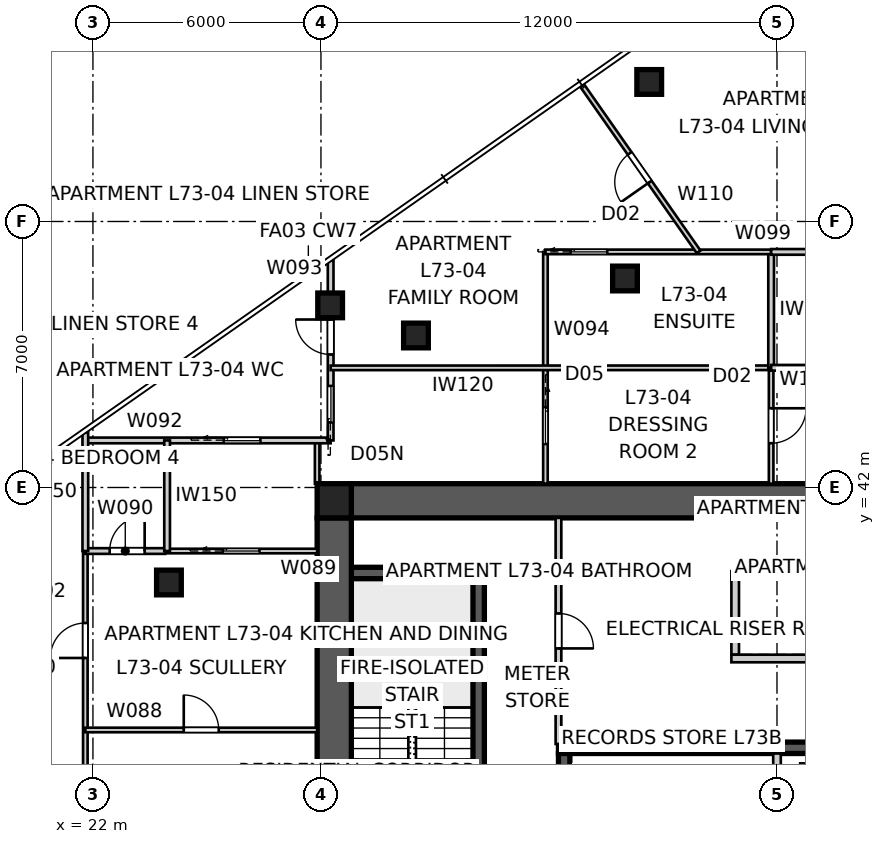
"""IFC4 building model, lengths in metres.
Left out: names, types, materials, properties, quantities, classifications, styles, units other than length and angle.
Written with IfcOpenShell. Run it as: python <this file> out.ifc"""

import sys

from ifc_helpers import new_model, si_unit, direction, frame, frame_2d, origin, origin_2d, place, context, subcontext, project, spatial, polyline, rectangle, outline, extrude, element, fill, save


model = new_model("IFC4")
c1 = context("Model", 3, precision=1e-05, world=origin(), true_north=direction((0.0, 1.0)))
c2 = subcontext(c1, "Body", "Model", "MODEL_VIEW")
j1 = project(units=[si_unit("LENGTHUNIT", "METRE"), si_unit("PLANEANGLEUNIT", "RADIAN")], contexts=[c1])
p1 = place(None, origin())
s1 = spatial("IfcSite", under=j1, at=p1, CompositionType="ELEMENT")
p2 = place(p1, origin())
s2 = spatial("IfcBuilding", under=s1, at=p2, CompositionType="ELEMENT")
p3 = place(p2, frame((0.0, 0.0, 264.2)))
s3 = spatial("IfcBuildingStorey", under=s2, at=p3, CompositionType="ELEMENT", Elevation=264.2)
p4 = place(p3, frame((28.8, 41.65, 0.0), z_axis=(0.0, 0.0, 1.0), x_axis=(1.0, 0.0, 0.0)))
e1 = element("IfcWall", 1, at=p4, inside=s3, PredefinedType="SHEAR", context=c2, shape_type="SweptSolid", body=[
    extrude(outline(polyline([(0.0, -0.45), (22.4, -0.45), (22.4, -0.025), (22.85, -0.025), (22.85, 0.025), (22.4, 0.025), (22.4, 0.45), (0.0, 0.45), (0.0, 0.025), (-0.45, 0.025), (-0.45, -0.025), (0.0, -0.025), (0.0, -0.45)])), origin(), (0.0, 0.0, 1.0), 3.4),
])
p5 = place(p3, frame((28.35, 41.2, 0.0), z_axis=(0.0, 0.0, 1.0), x_axis=(0.0, -1.0, 0.0)))
e2 = element("IfcWall", 2, at=p5, inside=s3, PredefinedType="SHEAR", context=c2, shape_type="SweptSolid", body=[
    extrude(outline(polyline([(0.0, -0.45), (22.4, -0.45), (22.4, -0.025), (22.85, -0.025), (22.85, 0.025), (22.4, 0.025), (22.4, 0.45), (0.0, 0.45), (0.0, 0.025), (-0.45, 0.025), (-0.45, -0.025), (0.0, -0.025), (0.0, -0.45)])), origin(), (0.0, 0.0, 1.0), 3.4),
])
p6 = place(p5, frame((11.14, 0.0, 0.0)))
e3 = element("IfcOpeningElement", 3, at=p6, cuts=e2, PredefinedType="OPENING", context=c2, shape_type="SweptSolid", body=[
    extrude(rectangle(XDim=1.02, YDim=2.4, at=frame_2d((0.51, 1.2))), frame((0.0, 0.46, 0.0), z_axis=(0.0, -1.0, 0.0), x_axis=(1.0, 0.0, 0.0)), (0.0, 0.0, 1.0), 0.92),
])
p7 = place(p3, frame((34.25, 35.15, 0.0), z_axis=(0.0, 0.0, 1.0), x_axis=(1.0, 0.0, 0.0)))
e4 = element("IfcWall", 4, at=p7, inside=s3, PredefinedType="SHEAR", context=c2, shape_type="SweptSolid", body=[
    extrude(rectangle(XDim=11.5, YDim=0.3, at=frame_2d((5.75, 0.0))), origin(), (0.0, 0.0, 1.0), 3.4),
])
p8 = place(p3, frame((34.4, 32.2, 0.0), z_axis=(0.0, 0.0, 1.0), x_axis=(0.0, 1.0, 0.0)))
e5 = element("IfcWall", 5, at=p8, inside=s3, PredefinedType="SHEAR", context=c2, shape_type="SweptSolid", body=[
    extrude(rectangle(XDim=2.8, YDim=0.3, at=frame_2d((1.4, 0.0))), origin(), (0.0, 0.0, 1.0), 3.4),
])
p9 = place(p3, frame((40.0, 32.2, 0.0), z_axis=(0.0, 0.0, 1.0), x_axis=(0.0, 1.0, 0.0)))
e6 = element("IfcWall", 6, at=p9, inside=s3, PredefinedType="SOLIDWALL", context=c2, shape_type="SweptSolid", body=[
    extrude(rectangle(XDim=2.8, YDim=0.2, at=frame_2d((1.4, 0.0))), origin(), (0.0, 0.0, 1.0), 3.4),
])
p10 = place(p3, frame((32.15, 32.2, 0.0), z_axis=(0.0, 0.0, 1.0), x_axis=(0.0, 1.0, 0.0)))
e7 = element("IfcWall", 7, at=p10, inside=s3, PredefinedType="SHEAR", context=c2, shape_type="SweptSolid", body=[
    extrude(rectangle(XDim=7.7, YDim=0.3, at=frame_2d((3.85, 0.0))), origin(), (0.0, 0.0, 1.0), 3.4),
])
p11 = place(p3, frame((28.8, 39.75, 0.0), z_axis=(0.0, 0.0, 1.0), x_axis=(1.0, 0.0, 0.0)))
e8 = element("IfcWall", 8, at=p11, inside=s3, PredefinedType="SHEAR", context=c2, shape_type="SweptSolid", body=[
    extrude(rectangle(XDim=3.5, YDim=0.3, at=frame_2d((1.75, 0.0))), origin(), (0.0, 0.0, 1.0), 3.4),
])
p12 = place(p3, frame((38.9, 37.6, 0.0), z_axis=(0.0, 0.0, 1.0), x_axis=(0.0, 1.0, 0.0)))
e9 = element("IfcWall", 9, at=p12, inside=s3, PredefinedType="SOLIDWALL", context=c2, shape_type="SweptSolid", body=[
    extrude(rectangle(XDim=2.0, YDim=0.2, at=frame_2d((1.0, 0.0))), origin(), (0.0, 0.0, 1.0), 3.4),
])
for number, where, z_axis, x_axis in (
    (10, (38.8, 37.5, 0.0), (0.0, 0.0, 1.0), (1.0, 0.0, 0.0)),
    (11, (38.8, 39.7, 0.0), (0.0, 0.0, 1.0), (1.0, 0.0, 0.0)),
):
    element("IfcWall", number, at=place(p3, frame(where, z_axis=z_axis, x_axis=x_axis)), inside=s3, PredefinedType="SOLIDWALL", context=c2, shape_type="SweptSolid", body=[
        extrude(rectangle(XDim=2.4, YDim=0.2, at=frame_2d((1.2, 0.0))), origin(), (0.0, 0.0, 1.0), 3.4),
    ])
p13 = place(p3, frame((28.35, 41.65, 0.0), z_axis=(0.0, 0.0, 1.0), x_axis=(1.0, 0.0, 0.0)))
e12 = element("IfcColumn", 12, at=p13, inside=s3, PredefinedType="COLUMN", context=c2, shape_type="SweptSolid", body=[
    extrude(rectangle(XDim=0.9, YDim=0.9, at=origin_2d()), origin(), (0.0, 0.0, 1.0), 3.4),
])
for number, where, z_axis, x_axis in (
    (13, (36.638, 52.672, 0.0), (0.0, 0.0, 1.0), (1.0, 0.0, 0.0)),
    (14, (28.242, 46.793, 0.0), (0.0, 0.0, 1.0), (1.0, 0.0, 0.0)),
):
    element("IfcColumn", number, at=place(p3, frame(where, z_axis=z_axis, x_axis=x_axis)), inside=s3, PredefinedType="COLUMN", context=c2, shape_type="SweptSolid", body=[
        extrude(rectangle(XDim=0.65, YDim=0.65, at=origin_2d()), origin(), (0.0, 0.0, 1.0), 3.2),
    ])
for number, where, z_axis, x_axis in (
    (15, (36.0, 47.5, 0.0), (0.0, 0.0, 1.0), (1.0, 0.0, 0.0)),
    (16, (30.5, 46.0, 0.0), (0.0, 0.0, 1.0), (1.0, 0.0, 0.0)),
    (17, (24.0, 39.5, 0.0), (0.0, 0.0, 1.0), (1.0, 0.0, 0.0)),
):
    element("IfcColumn", number, at=place(p3, frame(where, z_axis=z_axis, x_axis=x_axis)), inside=s3, PredefinedType="COLUMN", context=c2, shape_type="SweptSolid", body=[
        extrude(rectangle(XDim=0.65, YDim=0.65, at=origin_2d()), origin(), (0.0, 0.0, 1.0), 3.4),
    ])
p14 = place(p3, frame((34.25, 41.2, 0.0), z_axis=(0.0, 0.0, 1.0), x_axis=(0.0, -1.0, 0.0)))
e18 = element("IfcWall", 18, at=p14, inside=s3, PredefinedType="SOLIDWALL", context=c2, shape_type="SweptSolid", body=[
    extrude(rectangle(XDim=5.95, YDim=0.15, at=frame_2d((2.975, 0.0))), origin(), (0.0, 0.0, 1.0), 3.2),
])
p15 = place(p14, frame((2.515, 0.0, 0.0)))
e19 = element("IfcOpeningElement", 19, at=p15, cuts=e18, PredefinedType="OPENING", context=c2, shape_type="SweptSolid", body=[
    extrude(rectangle(XDim=0.92, YDim=2.1, at=frame_2d((0.46, 1.05))), frame((0.0, 0.085, 0.0), z_axis=(0.0, -1.0, 0.0), x_axis=(1.0, 0.0, 0.0)), (0.0, 0.0, 1.0), 0.17),
])
p16 = place(p3, frame((21.8, 18.578, 0.0), z_axis=(0.0, 0.0, 1.0), x_axis=(0.0, 1.0, 0.0)))
e20 = element("IfcWall", 20, at=p16, inside=s3, PredefinedType="PARTITIONING", context=c2, shape_type="SweptSolid", body=[
    extrude(rectangle(XDim=21.75, YDim=0.12, at=frame_2d((10.875, 0.0))), origin(), (0.0, 0.0, 1.0), 3.2),
])
p17 = place(p16, frame((11.53, 0.0, 0.0)))
e21 = element("IfcOpeningElement", 21, at=p17, cuts=e20, PredefinedType="OPENING", context=c2, shape_type="SweptSolid", body=[
    extrude(rectangle(XDim=0.92, YDim=2.34, at=frame_2d((0.46, 1.17))), frame((0.0, 0.07, 0.0), z_axis=(0.0, -1.0, 0.0), x_axis=(1.0, 0.0, 0.0)), (0.0, 0.0, 1.0), 0.14),
])
p18 = place(p16, frame((5.585, 0.0, 0.0)))
e22 = element("IfcOpeningElement", 22, at=p18, cuts=e20, PredefinedType="OPENING", context=c2, shape_type="SweptSolid", body=[
    extrude(rectangle(XDim=0.96, YDim=2.1, at=frame_2d((0.48, 1.05))), frame((0.0, 0.07, 0.0), z_axis=(0.0, -1.0, 0.0), x_axis=(1.0, 0.0, 0.0)), (0.0, 0.0, 1.0), 0.14),
])
p19 = place(p16, frame((18.936, 0.0, 0.0)))
e23 = element("IfcOpeningElement", 23, at=p19, cuts=e20, PredefinedType="OPENING", context=c2, shape_type="SweptSolid", body=[
    extrude(rectangle(XDim=0.92, YDim=2.34, at=frame_2d((0.46, 1.17))), frame((0.0, 0.07, 0.0), z_axis=(0.0, -1.0, 0.0), x_axis=(1.0, 0.0, 0.0)), (0.0, 0.0, 1.0), 0.14),
])
p20 = place(p3, frame((21.8, 35.619, 0.0), z_axis=(0.0, 0.0, 1.0), x_axis=(1.0, 0.0, 0.0)))
e24 = element("IfcWall", 24, at=p20, inside=s3, PredefinedType="PARTITIONING", context=c2, shape_type="SweptSolid", body=[
    extrude(rectangle(XDim=6.1, YDim=0.12, at=frame_2d((3.05, 0.0))), origin(), (0.0, 0.0, 1.0), 3.2),
])
p21 = place(p20, frame((2.59, 0.0, 0.0)))
e25 = element("IfcOpeningElement", 25, at=p21, cuts=e24, PredefinedType="OPENING", context=c2, shape_type="SweptSolid", body=[
    extrude(rectangle(XDim=0.92, YDim=2.34, at=frame_2d((0.46, 1.17))), frame((0.0, 0.07, 0.0), z_axis=(0.0, -1.0, 0.0), x_axis=(1.0, 0.0, 0.0)), (0.0, 0.0, 1.0), 0.14),
])
p22 = place(p3, frame((23.902, 40.328, 0.0), z_axis=(0.0, 0.0, 1.0), x_axis=(1.0, 0.0, 0.0)))
e26 = element("IfcWall", 26, at=p22, inside=s3, PredefinedType="PARTITIONING", context=c2, shape_type="SweptSolid", body=[
    extrude(rectangle(XDim=3.998, YDim=0.12, at=frame_2d((1.999, 0.0))), origin(), (0.0, 0.0, 1.0), 3.2),
])
p23 = place(p22, frame((1.519, 0.0, 0.0)))
e27 = element("IfcOpeningElement", 27, at=p23, cuts=e26, PredefinedType="OPENING", context=c2, shape_type="SweptSolid", body=[
    extrude(rectangle(XDim=0.96, YDim=2.1, at=frame_2d((0.48, 1.05))), frame((0.0, 0.07, 0.0), z_axis=(0.0, -1.0, 0.0), x_axis=(1.0, 0.0, 0.0)), (0.0, 0.0, 1.0), 0.14),
])
p24 = place(p3, frame((21.8, 40.328, 0.0), z_axis=(0.0, 0.0, 1.0), x_axis=(1.0, 0.0, 0.0)))
e28 = element("IfcWall", 28, at=p24, inside=s3, PredefinedType="SOLIDWALL", context=c2, shape_type="SweptSolid", body=[
    extrude(rectangle(XDim=2.102, YDim=0.15, at=frame_2d((1.051, 0.0))), origin(), (0.0, 0.0, 1.0), 3.2),
])
p25 = place(p24, frame((0.641, 0.0, 0.0)))
e29 = element("IfcOpeningElement", 29, at=p25, cuts=e28, PredefinedType="OPENING", context=c2, shape_type="SweptSolid", body=[
    extrude(rectangle(XDim=0.92, YDim=2.34, at=frame_2d((0.46, 1.17))), frame((0.0, 0.085, 0.0), z_axis=(0.0, -1.0, 0.0), x_axis=(1.0, 0.0, 0.0)), (0.0, 0.0, 1.0), 0.17),
])
p26 = place(p3, frame((27.9, 42.1, 0.0), z_axis=(0.0, 0.0, 1.0), x_axis=(0.0, 1.0, 0.0)))
e30 = element("IfcWall", 30, at=p26, inside=s3, PredefinedType="PARTITIONING", context=c2, shape_type="SweptSolid", body=[
    extrude(rectangle(XDim=1.138, YDim=0.12, at=frame_2d((0.569, 0.0))), origin(), (0.0, 0.0, 1.0), 3.2),
])
p27 = place(p3, frame((21.8, 43.238, 0.0), z_axis=(0.0, 0.0, 1.0), x_axis=(1.0, 0.0, 0.0)))
e31 = element("IfcWall", 31, at=p27, inside=s3, PredefinedType="SOLIDWALL", context=c2, shape_type="SweptSolid", body=[
    extrude(rectangle(XDim=6.455, YDim=0.15, at=frame_2d((3.228, 0.0))), origin(), (0.0, 0.0, 1.0), 3.2),
])
p28 = place(p27, frame((3.646, 0.0, 0.0)))
e32 = element("IfcOpeningElement", 32, at=p28, cuts=e31, PredefinedType="OPENING", context=c2, shape_type="SweptSolid", body=[
    extrude(rectangle(XDim=0.96, YDim=2.1, at=frame_2d((0.48, 1.05))), frame((0.0, 0.085, 0.0), z_axis=(0.0, -1.0, 0.0), x_axis=(1.0, 0.0, 0.0)), (0.0, 0.0, 1.0), 0.17),
])
p29 = place(p3, frame((28.255, 43.238, 0.0), z_axis=(0.0, 0.0, 1.0), x_axis=(0.0, 1.0, 0.0)))
e33 = element("IfcWall", 33, at=p29, inside=s3, PredefinedType="SOLIDWALL", context=c2, shape_type="SweptSolid", body=[
    extrude(rectangle(XDim=4.736, YDim=0.15, at=frame_2d((2.368, 0.0))), origin(), (0.0, 0.0, 1.0), 3.2),
])
p30 = place(p29, frame((2.262, 0.0, 0.0)))
e34 = element("IfcOpeningElement", 34, at=p30, cuts=e33, PredefinedType="OPENING", context=c2, shape_type="SweptSolid", body=[
    extrude(rectangle(XDim=0.92, YDim=2.34, at=frame_2d((0.46, 1.17))), frame((0.0, 0.085, 0.0), z_axis=(0.0, -1.0, 0.0), x_axis=(1.0, 0.0, 0.0)), (0.0, 0.0, 1.0), 0.17),
])
p31 = place(p29, frame((0.475, 0.0, 0.0)))
e35 = element("IfcOpeningElement", 35, at=p31, cuts=e33, PredefinedType="OPENING", context=c2, shape_type="SweptSolid", body=[
    extrude(rectangle(XDim=0.96, YDim=2.0, at=frame_2d((0.48, 1.0))), frame((0.0, 0.085, 0.0), z_axis=(0.0, -1.0, 0.0), x_axis=(1.0, 0.0, 0.0)), (0.0, 0.0, 1.0), 0.17),
])
p32 = place(p3, frame((33.907, 48.2, 0.0), z_axis=(0.0, 0.0, 1.0), x_axis=(0.0, -1.0, 0.0)))
e36 = element("IfcWall", 36, at=p32, inside=s3, PredefinedType="PARTITIONING", context=c2, shape_type="SweptSolid", body=[
    extrude(rectangle(XDim=6.1, YDim=0.12, at=frame_2d((3.05, 0.0))), origin(), (0.0, 0.0, 1.0), 3.2),
])
p33 = place(p32, frame((4.096, 0.0, 0.0)))
e37 = element("IfcOpeningElement", 37, at=p33, cuts=e36, PredefinedType="OPENING", context=c2, shape_type="SweptSolid", body=[
    extrude(rectangle(XDim=0.96, YDim=2.1, at=frame_2d((0.48, 1.05))), frame((0.0, 0.07, 0.0), z_axis=(0.0, -1.0, 0.0), x_axis=(1.0, 0.0, 0.0)), (0.0, 0.0, 1.0), 0.14),
])
p34 = place(p3, frame((28.255, 45.148, 0.0), z_axis=(0.0, 0.0, 1.0), x_axis=(0.99999998913, 0.000147442917, 0.0)))
e38 = element("IfcWall", 38, at=p34, inside=s3, PredefinedType="PARTITIONING", context=c2, shape_type="SweptSolid", body=[
    extrude(rectangle(XDim=11.591, YDim=0.12, at=frame_2d((5.795, 0.0))), origin(), (0.0, 0.0, 1.0), 3.2),
])
p35 = place(p3, frame((23.952, 40.328, 0.0), z_axis=(0.0, 0.0, 1.0), x_axis=(0.0, 1.0, 0.0)))
e39 = element("IfcWall", 39, at=p35, inside=s3, PredefinedType="SOLIDWALL", context=c2, shape_type="SweptSolid", body=[
    extrude(rectangle(XDim=2.91, YDim=0.15, at=frame_2d((1.455, 0.0))), origin(), (0.0, 0.0, 1.0), 3.2),
])
p36 = place(p3, frame((21.8, 40.328, 0.0), z_axis=(0.0, 0.0, 1.0), x_axis=(0.0, 1.0, 0.0)))
e40 = element("IfcWall", 40, at=p36, inside=s3, PredefinedType="SOLIDWALL", context=c2, shape_type="SweptSolid", body=[
    extrude(rectangle(XDim=3.126, YDim=0.15, at=frame_2d((1.563, 0.0))), origin(), (0.0, 0.0, 1.0), 3.2),
])
p37 = place(p3, frame((39.846, 48.2, 0.0), z_axis=(0.0, 0.0, 1.0), x_axis=(0.0, -1.0, 0.0)))
e41 = element("IfcWall", 41, at=p37, inside=s3, PredefinedType="SOLIDWALL", context=c2, shape_type="SweptSolid", body=[
    extrude(rectangle(XDim=3.05, YDim=0.15, at=frame_2d((1.525, 0.0))), origin(), (0.0, 0.0, 1.0), 3.2),
])
p38 = place(p3, frame((33.907, 48.2, 0.0), z_axis=(0.0, 0.0, 1.0), x_axis=(1.0, 0.0, 0.0)))
e42 = element("IfcWall", 42, at=p38, inside=s3, PredefinedType="PARTITIONING", context=c2, shape_type="SweptSolid", body=[
    extrude(rectangle(XDim=5.939, YDim=0.12, at=frame_2d((2.969, 0.0))), origin(), (0.0, 0.0, 1.0), 3.2),
])
p39 = place(p38, frame((0.666, 0.0, 0.0)))
e43 = element("IfcOpeningElement", 43, at=p39, cuts=e42, PredefinedType="OPENING", context=c2, shape_type="SweptSolid", body=[
    extrude(rectangle(XDim=0.96, YDim=2.1, at=frame_2d((0.48, 1.05))), frame((0.0, 0.07, 0.0), z_axis=(0.0, -1.0, 0.0), x_axis=(1.0, 0.0, 0.0)), (0.0, 0.0, 1.0), 0.14),
])
p40 = place(p3, frame((39.846, 45.15, 0.0), z_axis=(0.0, 0.0, 1.0), x_axis=(0.0, -1.0, 0.0)))
e44 = element("IfcWall", 44, at=p40, inside=s3, PredefinedType="PARTITIONING", context=c2, shape_type="SweptSolid", body=[
    extrude(rectangle(XDim=3.05, YDim=0.12, at=frame_2d((1.525, 0.0))), origin(), (0.0, 0.0, 1.0), 3.2),
])
p41 = place(p40, frame((1.065, 0.0, 0.0)))
e45 = element("IfcOpeningElement", 45, at=p41, cuts=e44, PredefinedType="OPENING", context=c2, shape_type="SweptSolid", body=[
    extrude(rectangle(XDim=0.92, YDim=2.34, at=frame_2d((0.46, 1.17))), frame((0.0, 0.07, 0.0), z_axis=(0.0, -1.0, 0.0), x_axis=(1.0, 0.0, 0.0)), (0.0, 0.0, 1.0), 0.14),
])
p42 = place(p3, frame((39.846, 45.15, 0.0), z_axis=(0.0, 0.0, 1.0), x_axis=(1.0, 0.0, 0.0)))
e46 = element("IfcWall", 46, at=p42, inside=s3, PredefinedType="SOLIDWALL", context=c2, shape_type="SweptSolid", body=[
    extrude(rectangle(XDim=9.784, YDim=0.15, at=frame_2d((4.892, 0.0))), origin(), (0.0, 0.0, 1.0), 3.2),
])
p43 = place(p3, frame((39.846, 48.2, 0.0), z_axis=(0.0, 0.0, 1.0), x_axis=(1.0, 0.0, 0.0)))
e47 = element("IfcWall", 47, at=p43, inside=s3, PredefinedType="SOLIDWALL", context=c2, shape_type="SweptSolid", body=[
    extrude(rectangle(XDim=9.784, YDim=0.15, at=frame_2d((4.892, 0.0))), origin(), (0.0, 0.0, 1.0), 3.2),
])
p44 = place(p43, frame((1.51, 0.0, 0.0)))
e48 = element("IfcOpeningElement", 48, at=p44, cuts=e47, PredefinedType="OPENING", context=c2, shape_type="SweptSolid", body=[
    extrude(rectangle(XDim=0.92, YDim=2.34, at=frame_2d((0.46, 1.17))), frame((0.0, 0.085, 0.0), z_axis=(0.0, -1.0, 0.0), x_axis=(1.0, 0.0, 0.0)), (0.0, 0.0, 1.0), 0.17),
])
p45 = place(p43, frame((6.878, 0.0, 0.0)))
e49 = element("IfcOpeningElement", 49, at=p45, cuts=e47, PredefinedType="OPENING", context=c2, shape_type="SweptSolid", body=[
    extrude(rectangle(XDim=0.92, YDim=2.34, at=frame_2d((0.46, 1.17))), frame((0.0, 0.085, 0.0), z_axis=(0.0, -1.0, 0.0), x_axis=(1.0, 0.0, 0.0)), (0.0, 0.0, 1.0), 0.17),
])
p46 = place(p3, frame((37.938, 48.2, 0.0), z_axis=(0.0, 0.0, 1.0), x_axis=(-0.573560001964, 0.819163551525, 0.0)))
e50 = element("IfcWall", 50, at=p46, inside=s3, PredefinedType="PARTITIONING", context=c2, shape_type="SweptSolid", body=[
    extrude(rectangle(XDim=5.369, YDim=0.12, at=frame_2d((2.685, 0.0))), origin(), (0.0, 0.0, 1.0), 3.2),
])
p47 = place(p46, frame((2.244, 0.0, 0.0)))
e51 = element("IfcOpeningElement", 51, at=p47, cuts=e50, PredefinedType="OPENING", context=c2, shape_type="SweptSolid", body=[
    extrude(rectangle(XDim=0.92, YDim=2.34, at=frame_2d((0.46, 1.17))), frame((0.0, 0.07, 0.0), z_axis=(0.0, -1.0, 0.0), x_axis=(1.0, 0.0, 0.0)), (0.0, 0.0, 1.0), 0.14),
])
p48 = place(p3, frame((16.94, 40.051, 0.0), z_axis=(0.0, 0.0, 1.0), x_axis=(0.573576357466, -0.819152099525, 0.0)))
e52 = element("IfcWall", 52, at=p48, inside=s3, PredefinedType="PARTITIONING", context=c2, shape_type="SweptSolid", body=[
    extrude(rectangle(XDim=8.335, YDim=0.12, at=frame_2d((4.167, 0.0))), origin(), (0.0, 0.0, 1.0), 3.2),
])
p49 = place(p15, origin())
e53 = element("IfcDoor", 53, at=p49, inside=s3, OperationType="SINGLE_SWING_RIGHT", PredefinedType="DOOR", context=c2, shape_type="SweptSolid", body=[
    extrude(rectangle(XDim=0.92, YDim=2.1, at=frame_2d((0.46, 1.05))), frame((0.0, 0.025, 0.0), z_axis=(0.0, -1.0, 0.0), x_axis=(1.0, 0.0, 0.0)), (0.0, 0.0, 1.0), 0.05),
])
fill(e19, e53)
p50 = place(p21, origin())
e54 = element("IfcDoor", 54, at=p50, inside=s3, OperationType="SINGLE_SWING_LEFT", PredefinedType="DOOR", context=c2, shape_type="SweptSolid", body=[
    extrude(rectangle(XDim=0.92, YDim=2.34, at=frame_2d((0.46, 1.17))), frame((0.0, 0.025, 0.0), z_axis=(0.0, -1.0, 0.0), x_axis=(1.0, 0.0, 0.0)), (0.0, 0.0, 1.0), 0.05),
])
fill(e25, e54)
p51 = place(p19, origin())
e55 = element("IfcDoor", 55, at=p51, inside=s3, OperationType="SINGLE_SWING_LEFT", PredefinedType="DOOR", context=c2, shape_type="SweptSolid", body=[
    extrude(rectangle(XDim=0.92, YDim=2.34, at=frame_2d((0.46, 1.17))), frame((0.0, 0.025, 0.0), z_axis=(0.0, -1.0, 0.0), x_axis=(1.0, 0.0, 0.0)), (0.0, 0.0, 1.0), 0.05),
])
fill(e23, e55)
p52 = place(p23, origin())
e56 = element("IfcDoor", 56, at=p52, inside=s3, OperationType="SLIDING_TO_LEFT", PredefinedType="DOOR", context=c2, shape_type="SweptSolid", body=[
    extrude(rectangle(XDim=0.96, YDim=2.1, at=frame_2d((0.48, 1.05))), frame((0.0, 0.025, 0.0), z_axis=(0.0, -1.0, 0.0), x_axis=(1.0, 0.0, 0.0)), (0.0, 0.0, 1.0), 0.05),
])
fill(e27, e56)
p53 = place(p25, origin())
e57 = element("IfcDoor", 57, at=p53, inside=s3, OperationType="SINGLE_SWING_RIGHT", PredefinedType="DOOR", context=c2, shape_type="SweptSolid", body=[
    extrude(rectangle(XDim=0.92, YDim=2.34, at=frame_2d((0.46, 1.17))), frame((0.0, 0.025, 0.0), z_axis=(0.0, -1.0, 0.0), x_axis=(1.0, 0.0, 0.0)), (0.0, 0.0, 1.0), 0.05),
])
fill(e29, e57)
p54 = place(p28, origin())
e58 = element("IfcDoor", 58, at=p54, inside=s3, OperationType="SLIDING_TO_LEFT", PredefinedType="DOOR", context=c2, shape_type="SweptSolid", body=[
    extrude(rectangle(XDim=0.96, YDim=2.1, at=frame_2d((0.48, 1.05))), frame((0.0, 0.025, 0.0), z_axis=(0.0, -1.0, 0.0), x_axis=(1.0, 0.0, 0.0)), (0.0, 0.0, 1.0), 0.05),
])
fill(e32, e58)
p55 = place(p30, origin())
e59 = element("IfcDoor", 59, at=p55, inside=s3, OperationType="SINGLE_SWING_RIGHT", PredefinedType="DOOR", context=c2, shape_type="SweptSolid", body=[
    extrude(rectangle(XDim=0.92, YDim=2.34, at=frame_2d((0.46, 1.17))), frame((0.0, 0.025, 0.0), z_axis=(0.0, -1.0, 0.0), x_axis=(1.0, 0.0, 0.0)), (0.0, 0.0, 1.0), 0.05),
])
fill(e34, e59)
p56 = place(p31, origin())
e60 = element("IfcDoor", 60, at=p56, inside=s3, OperationType="SLIDING_TO_LEFT", PredefinedType="DOOR", context=c2, shape_type="SweptSolid", body=[
    extrude(rectangle(XDim=0.96, YDim=2.0, at=frame_2d((0.48, 1.0))), frame((0.0, 0.025, 0.0), z_axis=(0.0, -1.0, 0.0), x_axis=(1.0, 0.0, 0.0)), (0.0, 0.0, 1.0), 0.05),
])
fill(e35, e60)
p57 = place(p47, origin())
e61 = element("IfcDoor", 61, at=p57, inside=s3, OperationType="SINGLE_SWING_LEFT", PredefinedType="DOOR", context=c2, shape_type="SweptSolid", body=[
    extrude(rectangle(XDim=0.92, YDim=2.34, at=frame_2d((0.46, 1.17))), frame((0.0, 0.025, 0.0), z_axis=(0.0, -1.0, 0.0), x_axis=(1.0, 0.0, 0.0)), (0.0, 0.0, 1.0), 0.05),
])
fill(e51, e61)
p58 = place(p39, origin())
e62 = element("IfcDoor", 62, at=p58, inside=s3, OperationType="SLIDING_TO_LEFT", PredefinedType="DOOR", context=c2, shape_type="SweptSolid", body=[
    extrude(rectangle(XDim=0.96, YDim=2.1, at=frame_2d((0.48, 1.05))), frame((0.0, 0.025, 0.0), z_axis=(0.0, -1.0, 0.0), x_axis=(1.0, 0.0, 0.0)), (0.0, 0.0, 1.0), 0.05),
])
fill(e43, e62)
p59 = place(p33, origin())
e63 = element("IfcDoor", 63, at=p59, inside=s3, OperationType="SLIDING_TO_LEFT", PredefinedType="DOOR", context=c2, shape_type="SweptSolid", body=[
    extrude(rectangle(XDim=0.96, YDim=2.1, at=frame_2d((0.48, 1.05))), frame((0.0, 0.025, 0.0), z_axis=(0.0, -1.0, 0.0), x_axis=(1.0, 0.0, 0.0)), (0.0, 0.0, 1.0), 0.05),
])
fill(e37, e63)
p60 = place(p41, origin())
e64 = element("IfcDoor", 64, at=p60, inside=s3, OperationType="SINGLE_SWING_LEFT", PredefinedType="DOOR", context=c2, shape_type="SweptSolid", body=[
    extrude(rectangle(XDim=0.92, YDim=2.34, at=frame_2d((0.46, 1.17))), frame((0.0, 0.025, 0.0), z_axis=(0.0, -1.0, 0.0), x_axis=(1.0, 0.0, 0.0)), (0.0, 0.0, 1.0), 0.05),
])
fill(e45, e64)
save(model, sys.argv[1])
